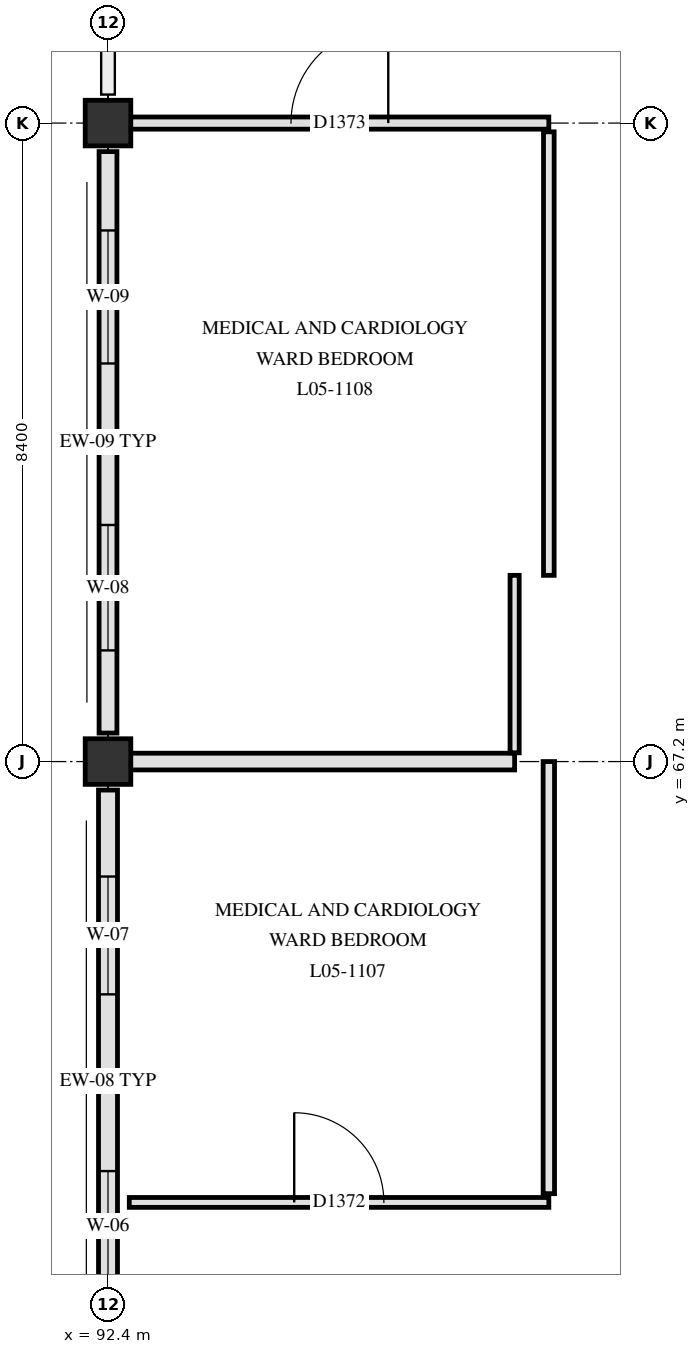
"""IFC4 building model, lengths in metres.
Left out: names, types, materials, properties, quantities, classifications, styles, units other than length and angle.
Written with IfcOpenShell. Run it as: python <this file> out.ifc"""

import sys

from ifc_helpers import new_model, si_unit, direction, frame, frame_2d, origin, origin_2d, place, context, subcontext, project, spatial, rectangle, extrude, element, fill, save


model = new_model("IFC4")
c1 = context("Model", 3, precision=1e-05, world=origin(), true_north=direction((0.0, 1.0)))
c2 = subcontext(c1, "Body", "Model", "MODEL_VIEW")
j1 = project(units=[si_unit("LENGTHUNIT", "METRE"), si_unit("PLANEANGLEUNIT", "RADIAN")], contexts=[c1])
p1 = place(None, origin())
s1 = spatial("IfcSite", under=j1, at=p1, CompositionType="ELEMENT")
p2 = place(p1, origin())
s2 = spatial("IfcBuilding", under=s1, at=p2, CompositionType="ELEMENT")
p3 = place(p2, frame((0.0, 0.0, 22.5)))
s3 = spatial("IfcBuildingStorey", under=s2, at=p3, CompositionType="ELEMENT", Elevation=22.5)
for number, where, z_axis, x_axis in (
    (1, (92.4, 67.2, 0.0), (0.0, 0.0, 1.0), (1.0, 0.0, 0.0)),
    (2, (92.4, 75.6, 0.0), (0.0, 0.0, 1.0), (1.0, 0.0, 0.0)),
):
    element("IfcColumn", number, at=place(p3, frame(where, z_axis=z_axis, x_axis=x_axis)), inside=s3, PredefinedType="COLUMN", context=c2, shape_type="SweptSolid", body=[
        extrude(rectangle(XDim=0.6, YDim=0.6, at=origin_2d()), origin(), (0.0, 0.0, 1.0), 3.9),
    ])
p4 = place(p3, frame((92.4, 59.175, 0.0), z_axis=(0.0, 0.0, 1.0), x_axis=(0.0, 1.0, 0.0)))
e3 = element("IfcWall", 3, at=p4, inside=s3, PredefinedType="SOLIDWALL", context=c2, shape_type="SweptSolid", body=[
    extrude(rectangle(XDim=7.65, YDim=0.25, at=frame_2d((3.825, 0.0))), origin(), (0.0, 0.0, 1.0), 3.38),
])
p5 = place(p4, frame((1.188, 0.0, 0.85)))
e4 = element("IfcOpeningElement", 4, at=p5, cuts=e3, PredefinedType="OPENING", context=c2, shape_type="SweptSolid", body=[
    extrude(rectangle(XDim=1.45, YDim=1.3, at=frame_2d((0.725, 0.65))), frame((0.0, 0.135, 0.0), z_axis=(0.0, -1.0, 0.0), x_axis=(1.0, 0.0, 0.0)), (0.0, 0.0, 1.0), 0.27),
])
p6 = place(p4, frame((4.962, 0.0, 0.85)))
e5 = element("IfcOpeningElement", 5, at=p6, cuts=e3, PredefinedType="OPENING", context=c2, shape_type="SweptSolid", body=[
    extrude(rectangle(XDim=1.55, YDim=1.3, at=frame_2d((0.775, 0.65))), frame((0.0, 0.135, 0.0), z_axis=(0.0, -1.0, 0.0), x_axis=(1.0, 0.0, 0.0)), (0.0, 0.0, 1.0), 0.27),
])
p7 = place(p3, frame((92.4, 67.575, 0.0), z_axis=(0.0, 0.0, 1.0), x_axis=(0.0, 1.0, 0.0)))
e6 = element("IfcWall", 6, at=p7, inside=s3, PredefinedType="SOLIDWALL", context=c2, shape_type="SweptSolid", body=[
    extrude(rectangle(XDim=7.65, YDim=0.235, at=frame_2d((3.825, 0.0))), origin(), (0.0, 0.0, 1.0), 3.38),
])
p8 = place(p7, frame((1.087, 0.0, 0.85)))
e7 = element("IfcOpeningElement", 7, at=p8, cuts=e6, PredefinedType="OPENING", context=c2, shape_type="SweptSolid", body=[
    extrude(rectangle(XDim=1.65, YDim=1.3, at=frame_2d((0.825, 0.65))), frame((0.0, 0.127, 0.0), z_axis=(0.0, -1.0, 0.0), x_axis=(1.0, 0.0, 0.0)), (0.0, 0.0, 1.0), 0.255),
])
p9 = place(p7, frame((4.863, 0.0, 0.85)))
e8 = element("IfcOpeningElement", 8, at=p9, cuts=e6, PredefinedType="OPENING", context=c2, shape_type="SweptSolid", body=[
    extrude(rectangle(XDim=1.75, YDim=1.3, at=frame_2d((0.875, 0.65))), frame((0.0, 0.127, 0.0), z_axis=(0.0, -1.0, 0.0), x_axis=(1.0, 0.0, 0.0)), (0.0, 0.0, 1.0), 0.255),
])
p10 = place(p3, frame((92.68, 61.4, 0.0), z_axis=(0.0, 0.0, 1.0), x_axis=(1.0, 0.0, 0.0)))
e9 = element("IfcWall", 9, at=p10, inside=s3, PredefinedType="PARTITIONING", context=c2, shape_type="SweptSolid", body=[
    extrude(rectangle(XDim=5.52, YDim=0.13, at=frame_2d((2.76, 0.0))), origin(), (0.0, 0.0, 1.0), 3.61),
])
p11 = place(p10, frame((2.17, 0.0, 0.0)))
e10 = element("IfcOpeningElement", 10, at=p11, cuts=e9, PredefinedType="OPENING", context=c2, shape_type="SweptSolid", body=[
    extrude(rectangle(XDim=1.18, YDim=2.18, at=frame_2d((0.59, 1.09))), frame((0.0, 0.075, 0.0), z_axis=(0.0, -1.0, 0.0), x_axis=(1.0, 0.0, 0.0)), (0.0, 0.0, 1.0), 0.15),
])
p12 = place(p3, frame((92.695, 67.2, 0.0), z_axis=(0.0, 0.0, 1.0), x_axis=(1.0, 0.0, 0.0)))
e11 = element("IfcWall", 11, at=p12, inside=s3, PredefinedType="PARTITIONING", context=c2, shape_type="SweptSolid", body=[
    extrude(rectangle(XDim=5.055, YDim=0.22, at=frame_2d((2.527, 0.0))), origin(), (0.0, 0.0, 1.0), 3.16),
])
p13 = place(p3, frame((92.695, 75.6, 0.0), z_axis=(0.0, 0.0, 1.0), x_axis=(1.0, 0.0, 0.0)))
e12 = element("IfcWall", 12, at=p13, inside=s3, PredefinedType="PARTITIONING", context=c2, shape_type="SweptSolid", body=[
    extrude(rectangle(XDim=5.505, YDim=0.16, at=frame_2d((2.752, 0.0))), origin(), (0.0, 0.0, 1.0), 3.16),
])
p14 = place(p13, frame((2.113, 0.0, 0.0)))
e13 = element("IfcOpeningElement", 13, at=p14, cuts=e12, PredefinedType="OPENING", context=c2, shape_type="SweptSolid", body=[
    extrude(rectangle(XDim=1.28, YDim=2.18, at=frame_2d((0.64, 1.09))), frame((0.0, 0.09, 0.0), z_axis=(0.0, -1.0, 0.0), x_axis=(1.0, 0.0, 0.0)), (0.0, 0.0, 1.0), 0.18),
])
p15 = place(p3, frame((97.75, 67.315, 0.0), z_axis=(0.0, 0.0, 1.0), x_axis=(0.0, 1.0, 0.0)))
e14 = element("IfcWall", 14, at=p15, inside=s3, PredefinedType="PARTITIONING", context=c2, shape_type="SweptSolid", body=[
    extrude(rectangle(XDim=2.335, YDim=0.12, at=frame_2d((1.167, 0.0))), origin(), (0.0, 0.0, 1.0), 3.61),
])
p16 = place(p3, frame((98.2, 61.515, 0.0), z_axis=(0.0, 0.0, 1.0), x_axis=(0.0, 1.0, 0.0)))
e15 = element("IfcWall", 15, at=p16, inside=s3, PredefinedType="PARTITIONING", context=c2, shape_type="SweptSolid", body=[
    extrude(rectangle(XDim=5.685, YDim=0.15, at=frame_2d((2.843, 0.0))), origin(), (0.0, 0.0, 1.0), 3.16),
])
p17 = place(p3, frame((98.2, 69.65, 0.0), z_axis=(0.0, 0.0, 1.0), x_axis=(0.0, 1.0, 0.0)))
e16 = element("IfcWall", 16, at=p17, inside=s3, PredefinedType="PARTITIONING", context=c2, shape_type="SweptSolid", body=[
    extrude(rectangle(XDim=5.835, YDim=0.14, at=frame_2d((2.917, 0.0))), origin(), (0.0, 0.0, 1.0), 3.34),
])
p18 = place(p5, origin())
e17 = element("IfcWindow", 17, at=p18, inside=s3, PartitioningType="SINGLE_PANEL", PredefinedType="WINDOW", context=c2, shape_type="SweptSolid", body=[
    extrude(rectangle(XDim=1.45, YDim=1.3, at=frame_2d((0.725, 0.65))), frame((0.0, 0.03, 0.0), z_axis=(0.0, -1.0, 0.0), x_axis=(1.0, 0.0, 0.0)), (0.0, 0.0, 1.0), 0.06),
])
fill(e4, e17)
p19 = place(p6, origin())
e18 = element("IfcWindow", 18, at=p19, inside=s3, PartitioningType="SINGLE_PANEL", PredefinedType="WINDOW", context=c2, shape_type="SweptSolid", body=[
    extrude(rectangle(XDim=1.55, YDim=1.3, at=frame_2d((0.775, 0.65))), frame((0.0, 0.03, 0.0), z_axis=(0.0, -1.0, 0.0), x_axis=(1.0, 0.0, 0.0)), (0.0, 0.0, 1.0), 0.06),
])
fill(e5, e18)
p20 = place(p8, origin())
e19 = element("IfcWindow", 19, at=p20, inside=s3, PartitioningType="SINGLE_PANEL", PredefinedType="WINDOW", context=c2, shape_type="SweptSolid", body=[
    extrude(rectangle(XDim=1.65, YDim=1.3, at=frame_2d((0.825, 0.65))), frame((0.0, 0.03, 0.0), z_axis=(0.0, -1.0, 0.0), x_axis=(1.0, 0.0, 0.0)), (0.0, 0.0, 1.0), 0.06),
])
fill(e7, e19)
p21 = place(p9, origin())
e20 = element("IfcWindow", 20, at=p21, inside=s3, PartitioningType="SINGLE_PANEL", PredefinedType="WINDOW", context=c2, shape_type="SweptSolid", body=[
    extrude(rectangle(XDim=1.75, YDim=1.3, at=frame_2d((0.875, 0.65))), frame((0.0, 0.03, 0.0), z_axis=(0.0, -1.0, 0.0), x_axis=(1.0, 0.0, 0.0)), (0.0, 0.0, 1.0), 0.06),
])
fill(e8, e20)
p22 = place(p11, origin())
e21 = element("IfcDoor", 21, at=p22, inside=s3, OperationType="SINGLE_SWING_LEFT", PredefinedType="DOOR", context=c2, shape_type="SweptSolid", body=[
    extrude(rectangle(XDim=1.18, YDim=2.18, at=frame_2d((0.59, 1.09))), frame((0.0, 0.025, 0.0), z_axis=(0.0, -1.0, 0.0), x_axis=(1.0, 0.0, 0.0)), (0.0, 0.0, 1.0), 0.05),
])
fill(e10, e21)
p23 = place(p14, origin())
e22 = element("IfcDoor", 22, at=p23, inside=s3, OperationType="SINGLE_SWING_RIGHT", PredefinedType="DOOR", context=c2, shape_type="SweptSolid", body=[
    extrude(rectangle(XDim=1.28, YDim=2.18, at=frame_2d((0.64, 1.09))), frame((0.0, 0.025, 0.0), z_axis=(0.0, -1.0, 0.0), x_axis=(1.0, 0.0, 0.0)), (0.0, 0.0, 1.0), 0.05),
])
fill(e13, e22)
save(model, sys.argv[1])
